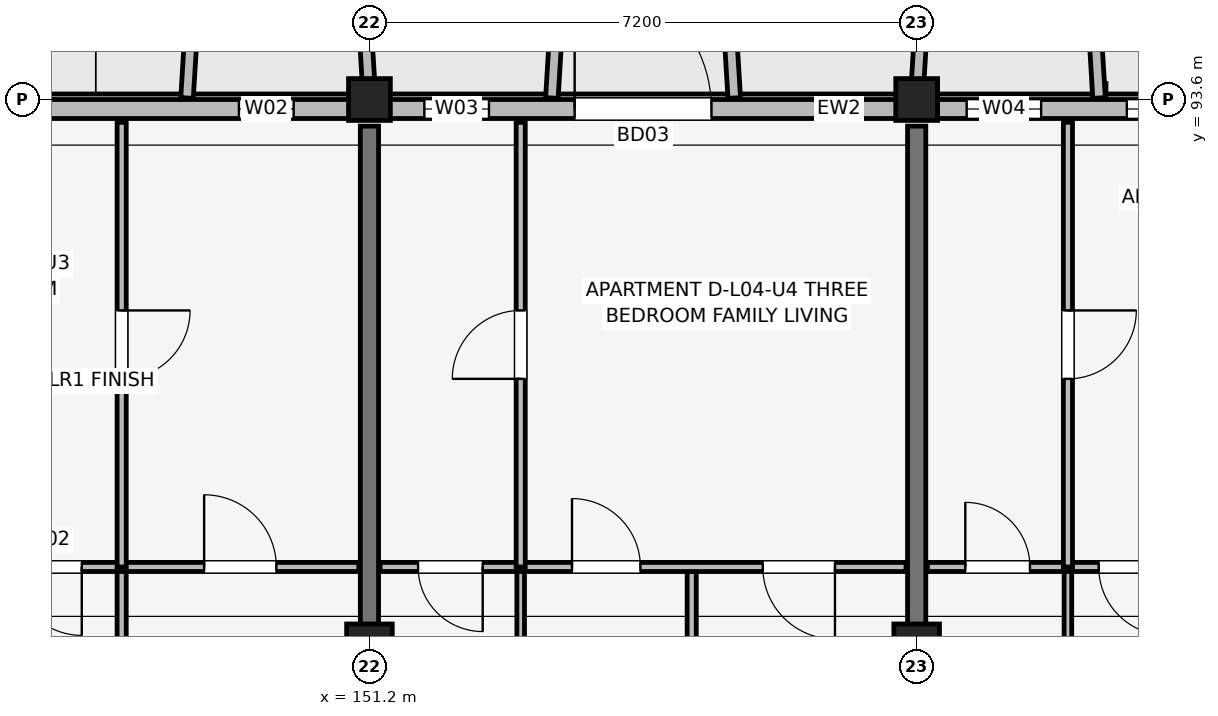
"""IFC4 building model, lengths in metres.
Left out: names, types, materials, properties, quantities, classifications, styles, units other than length and angle.
Written with IfcOpenShell. Run it as: python <this file> out.ifc"""

import sys

from ifc_helpers import new_model, si_unit, direction, frame, frame_2d, origin, origin_2d, place, context, subcontext, project, spatial, rectangle, extrude, element, fill, save


model = new_model("IFC4")
c1 = context("Model", 3, precision=1e-05, world=origin(), true_north=direction((0.0, 1.0)))
c2 = subcontext(c1, "Body", "Model", "MODEL_VIEW")
j1 = project(units=[si_unit("LENGTHUNIT", "METRE"), si_unit("PLANEANGLEUNIT", "RADIAN")], contexts=[c1])
p1 = place(None, origin())
s1 = spatial("IfcSite", under=j1, at=p1, CompositionType="ELEMENT")
p2 = place(p1, origin())
s2 = spatial("IfcBuilding", under=s1, at=p2, CompositionType="ELEMENT")
p3 = place(p2, frame((0.0, 0.0, 15.0)))
s3 = spatial("IfcBuildingStorey", under=s2, at=p3, CompositionType="ELEMENT", Elevation=15.0)
p4 = place(p3, frame((151.2, 86.4, 0.0), z_axis=(0.0, 0.0, 1.0), x_axis=(1.0, 0.0, 0.0)))
e1 = element("IfcColumn", 1, at=p4, inside=s3, PredefinedType="COLUMN", context=c2, shape_type="SweptSolid", body=[
    extrude(rectangle(XDim=0.6, YDim=0.6, at=origin_2d()), origin(), (0.0, 0.0, 1.0), 3.15),
])
p5 = place(p3, frame((151.2, 93.6, 0.0), z_axis=(0.0, 0.0, 1.0), x_axis=(1.0, 0.0, 0.0)))
e2 = element("IfcColumn", 2, at=p5, inside=s3, PredefinedType="COLUMN", context=c2, shape_type="SweptSolid", body=[
    extrude(rectangle(XDim=0.55, YDim=0.55, at=origin_2d()), origin(), (0.0, 0.0, 1.0), 3.15),
])
p6 = place(p3, frame((158.4, 86.4, 0.0), z_axis=(0.0, 0.0, 1.0), x_axis=(1.0, 0.0, 0.0)))
e3 = element("IfcColumn", 3, at=p6, inside=s3, PredefinedType="COLUMN", context=c2, shape_type="SweptSolid", body=[
    extrude(rectangle(XDim=0.6, YDim=0.6, at=origin_2d()), origin(), (0.0, 0.0, 1.0), 3.15),
])
p7 = place(p3, frame((158.4, 93.6, 0.0), z_axis=(0.0, 0.0, 1.0), x_axis=(1.0, 0.0, 0.0)))
e4 = element("IfcColumn", 4, at=p7, inside=s3, PredefinedType="COLUMN", context=c2, shape_type="SweptSolid", body=[
    extrude(rectangle(XDim=0.55, YDim=0.55, at=origin_2d()), origin(), (0.0, 0.0, 1.0), 3.15),
])
for number, where, z_axis, x_axis in (
    (5, (151.2, 83.85, 0.0), (0.0, 0.0, 1.0), (0.0, 1.0, 0.0)),
    (6, (158.4, 83.85, 0.0), (0.0, 0.0, 1.0), (0.0, 1.0, 0.0)),
):
    element("IfcWall", number, at=place(p3, frame(where, z_axis=z_axis, x_axis=x_axis)), inside=s3, PredefinedType="SHEAR", context=c2, shape_type="SweptSolid", body=[
        extrude(rectangle(XDim=9.4, YDim=0.24, at=frame_2d((4.7, 0.0))), origin(), (0.0, 0.0, 1.0), 3.15),
    ])
p8 = place(p3, frame((162.8, 93.475, 0.0), z_axis=(0.0, 0.0, 1.0), x_axis=(-1.0, 0.0, 0.0)))
e7 = element("IfcWall", 7, at=p8, inside=s3, PredefinedType="SOLIDWALL", context=c2, shape_type="SweptSolid", body=[
    extrude(rectangle(XDim=30.4, YDim=0.25, at=frame_2d((15.2, 0.0))), origin(), (0.0, 0.0, 1.0), 2.43),
])
p9 = place(p8, frame((23.15, 0.0, 0.0), z_axis=(0.0, 0.0, 1.0), x_axis=(-1.0, 0.0, 0.0)))
e8 = element("IfcOpeningElement", 8, at=p9, cuts=e7, PredefinedType="OPENING", context=c2, shape_type="SweptSolid", body=[
    extrude(rectangle(XDim=1.5, YDim=2.15, at=frame_2d((0.75, 1.075))), frame((0.0, 0.135, 0.0), z_axis=(0.0, -1.0, 0.0), x_axis=(1.0, 0.0, 0.0)), (0.0, 0.0, 1.0), 0.27),
])
p10 = place(p8, frame((8.9, 0.0, 0.0), z_axis=(0.0, 0.0, 1.0), x_axis=(-1.0, 0.0, 0.0)))
e9 = element("IfcOpeningElement", 9, at=p10, cuts=e7, PredefinedType="OPENING", context=c2, shape_type="SweptSolid", body=[
    extrude(rectangle(XDim=1.8, YDim=2.15, at=frame_2d((0.9, 1.075))), frame((0.0, 0.135, 0.0), z_axis=(0.0, -1.0, 0.0), x_axis=(1.0, 0.0, 0.0)), (0.0, 0.0, 1.0), 0.27),
])
p11 = place(p8, frame((26.498, 0.0, 0.7)))
e10 = element("IfcOpeningElement", 10, at=p11, cuts=e7, PredefinedType="OPENING", context=c2, shape_type="SweptSolid", body=[
    extrude(rectangle(XDim=1.72, YDim=1.6, at=frame_2d((0.86, 0.8))), frame((0.0, 0.135, 0.0), z_axis=(0.0, -1.0, 0.0), x_axis=(1.0, 0.0, 0.0)), (0.0, 0.0, 1.0), 0.27),
])
p12 = place(p8, frame((24.183, 0.0, 0.75)))
e11 = element("IfcOpeningElement", 11, at=p12, cuts=e7, PredefinedType="OPENING", context=c2, shape_type="SweptSolid", body=[
    extrude(rectangle(XDim=1.34, YDim=1.55, at=frame_2d((0.67, 0.775))), frame((0.0, 0.135, 0.0), z_axis=(0.0, -1.0, 0.0), x_axis=(1.0, 0.0, 0.0)), (0.0, 0.0, 1.0), 0.27),
])
p13 = place(p8, frame((16.583, 0.0, 0.7)))
e12 = element("IfcOpeningElement", 12, at=p13, cuts=e7, PredefinedType="OPENING", context=c2, shape_type="SweptSolid", body=[
    extrude(rectangle(XDim=1.72, YDim=1.6, at=frame_2d((0.86, 0.8))), frame((0.0, 0.135, 0.0), z_axis=(0.0, -1.0, 0.0), x_axis=(1.0, 0.0, 0.0)), (0.0, 0.0, 1.0), 0.27),
])
p14 = place(p8, frame((12.597, 0.0, 0.75)))
e13 = element("IfcOpeningElement", 13, at=p14, cuts=e7, PredefinedType="OPENING", context=c2, shape_type="SweptSolid", body=[
    extrude(rectangle(XDim=0.72, YDim=1.35, at=frame_2d((0.36, 0.675))), frame((0.0, 0.135, 0.0), z_axis=(0.0, -1.0, 0.0), x_axis=(1.0, 0.0, 0.0)), (0.0, 0.0, 1.0), 0.27),
])
p15 = place(p8, frame((10.028, 0.0, 0.75)))
e14 = element("IfcOpeningElement", 14, at=p15, cuts=e7, PredefinedType="OPENING", context=c2, shape_type="SweptSolid", body=[
    extrude(rectangle(XDim=0.85, YDim=1.4, at=frame_2d((0.425, 0.7))), frame((0.0, 0.135, 0.0), z_axis=(0.0, -1.0, 0.0), x_axis=(1.0, 0.0, 0.0)), (0.0, 0.0, 1.0), 0.27),
])
p16 = place(p8, frame((2.762, 0.0, 0.75)))
e15 = element("IfcOpeningElement", 15, at=p16, cuts=e7, PredefinedType="OPENING", context=c2, shape_type="SweptSolid", body=[
    extrude(rectangle(XDim=0.98, YDim=1.45, at=frame_2d((0.49, 0.725))), frame((0.0, 0.135, 0.0), z_axis=(0.0, -1.0, 0.0), x_axis=(1.0, 0.0, 0.0)), (0.0, 0.0, 1.0), 0.27),
])
p17 = place(p8, frame((0.535, 0.0, 0.75)))
e16 = element("IfcOpeningElement", 16, at=p17, cuts=e7, PredefinedType="OPENING", context=c2, shape_type="SweptSolid", body=[
    extrude(rectangle(XDim=1.1, YDim=1.5, at=frame_2d((0.55, 0.75))), frame((0.0, 0.135, 0.0), z_axis=(0.0, -1.0, 0.0), x_axis=(1.0, 0.0, 0.0)), (0.0, 0.0, 1.0), 0.27),
])
p18 = place(p3, frame((148.8, 93.62, 0.0), z_axis=(0.0, 0.0, 1.0), x_axis=(0.061046865508, 0.998134900808, 0.0)))
e17 = element("IfcWall", 17, at=p18, inside=s3, PredefinedType="ELEMENTEDWALL", context=c2, shape_type="SweptSolid", body=[
    extrude(rectangle(XDim=1.964, YDim=0.165, at=frame_2d((0.982, 0.0))), origin(), (0.0, 0.0, 1.0), 2.58),
])
p19 = place(p3, frame((151.2, 93.62, 0.0), z_axis=(0.0, 0.0, 1.0), x_axis=(-0.061046865508, 0.998134900808, 0.0)))
e18 = element("IfcWall", 18, at=p19, inside=s3, PredefinedType="ELEMENTEDWALL", context=c2, shape_type="SweptSolid", body=[
    extrude(rectangle(XDim=1.964, YDim=0.165, at=frame_2d((0.982, 0.0))), origin(), (0.0, 0.0, 1.0), 2.95),
])
for number, where, z_axis, x_axis in (
    (19, (153.6, 93.62, 0.0), (0.0, 0.0, 1.0), (0.061, 0.998, 0.0)),
    (20, (156.0, 93.62, 0.0), (0.0, 0.0, 1.0), (-0.061, 0.998, 0.0)),
):
    element("IfcWall", number, at=place(p3, frame(where, z_axis=z_axis, x_axis=x_axis)), inside=s3, PredefinedType="ELEMENTEDWALL", context=c2, shape_type="SweptSolid", body=[
        extrude(rectangle(XDim=1.964, YDim=0.165, at=frame_2d((0.982, 0.0))), origin(), (0.0, 0.0, 1.0), 2.45),
    ])
for number, where, z_axis, x_axis in (
    (21, (158.4, 93.62, 0.0), (0.0, 0.0, 1.0), (0.061, 0.998, 0.0)),
    (22, (160.8, 93.62, 0.0), (0.0, 0.0, 1.0), (-0.061, 0.998, 0.0)),
):
    element("IfcWall", number, at=place(p3, frame(where, z_axis=z_axis, x_axis=x_axis)), inside=s3, PredefinedType="ELEMENTEDWALL", context=c2, shape_type="SweptSolid", body=[
        extrude(rectangle(XDim=1.964, YDim=0.165, at=frame_2d((0.982, 0.0))), origin(), (0.0, 0.0, 1.0), 2.95),
    ])
p20 = place(p3, frame((147.94, 83.7, 0.0), z_axis=(0.0, 0.0, 1.0), x_axis=(0.0, 1.0, 0.0)))
e23 = element("IfcWall", 23, at=p20, inside=s3, PredefinedType="PARTITIONING", context=c2, shape_type="SweptSolid", body=[
    extrude(rectangle(XDim=3.75, YDim=0.12, at=frame_2d((1.875, 0.0))), origin(), (0.0, 0.0, 1.0), 2.375),
])
p21 = place(p3, frame((144.14, 87.45, 0.0), z_axis=(0.0, 0.0, 1.0), x_axis=(1.0, 0.0, 0.0)))
e24 = element("IfcWall", 24, at=p21, inside=s3, PredefinedType="PARTITIONING", context=c2, shape_type="SweptSolid", body=[
    extrude(rectangle(XDim=6.92, YDim=0.12, at=frame_2d((3.46, 0.0))), origin(), (0.0, 0.0, 1.0), 2.38),
])
p22 = place(p21, frame((0.5, 0.0, 0.0)))
e25 = element("IfcOpeningElement", 25, at=p22, cuts=e24, PredefinedType="OPENING", context=c2, shape_type="SweptSolid", body=[
    extrude(rectangle(XDim=0.85, YDim=2.08, at=frame_2d((0.425, 1.04))), frame((0.0, 0.07, 0.0), z_axis=(0.0, -1.0, 0.0), x_axis=(1.0, 0.0, 0.0)), (0.0, 0.0, 1.0), 0.14),
])
p23 = place(p21, frame((3.275, 0.0, 0.0), z_axis=(0.0, 0.0, 1.0), x_axis=(-1.0, 0.0, 0.0)))
e26 = element("IfcOpeningElement", 26, at=p23, cuts=e24, PredefinedType="OPENING", context=c2, shape_type="SweptSolid", body=[
    extrude(rectangle(XDim=0.9, YDim=2.08, at=frame_2d((0.45, 1.04))), frame((0.0, 0.07, 0.0), z_axis=(0.0, -1.0, 0.0), x_axis=(1.0, 0.0, 0.0)), (0.0, 0.0, 1.0), 0.14),
])
p24 = place(p21, frame((4.885, 0.0, 0.0)))
e27 = element("IfcOpeningElement", 27, at=p24, cuts=e24, PredefinedType="OPENING", context=c2, shape_type="SweptSolid", body=[
    extrude(rectangle(XDim=0.95, YDim=2.08, at=frame_2d((0.475, 1.04))), frame((0.0, 0.07, 0.0), z_axis=(0.0, -1.0, 0.0), x_axis=(1.0, 0.0, 0.0)), (0.0, 0.0, 1.0), 0.14),
])
p25 = place(p3, frame((147.94, 87.45, 0.0), z_axis=(0.0, 0.0, 1.0), x_axis=(0.0, 1.0, 0.0)))
e28 = element("IfcWall", 28, at=p25, inside=s3, PredefinedType="PARTITIONING", context=c2, shape_type="SweptSolid", body=[
    extrude(rectangle(XDim=5.85, YDim=0.12, at=frame_2d((2.925, 0.0))), origin(), (0.0, 0.0, 1.0), 2.38),
])
p26 = place(p25, frame((3.375, 0.0, 0.0), z_axis=(0.0, 0.0, 1.0), x_axis=(-1.0, 0.0, 0.0)))
e29 = element("IfcOpeningElement", 29, at=p26, cuts=e28, PredefinedType="OPENING", context=c2, shape_type="SweptSolid", body=[
    extrude(rectangle(XDim=0.9, YDim=2.08, at=frame_2d((0.45, 1.04))), frame((0.0, 0.07, 0.0), z_axis=(0.0, -1.0, 0.0), x_axis=(1.0, 0.0, 0.0)), (0.0, 0.0, 1.0), 0.14),
])
p27 = place(p3, frame((153.19, 83.7, 0.0), z_axis=(0.0, 0.0, 1.0), x_axis=(0.0, 1.0, 0.0)))
e30 = element("IfcWall", 30, at=p27, inside=s3, PredefinedType="PARTITIONING", context=c2, shape_type="SweptSolid", body=[
    extrude(rectangle(XDim=3.75, YDim=0.1, at=frame_2d((1.875, 0.0))), origin(), (0.0, 0.0, 1.0), 2.375),
])
p28 = place(p3, frame((155.44, 83.7, 0.0), z_axis=(0.0, 0.0, 1.0), x_axis=(0.0, 1.0, 0.0)))
e31 = element("IfcWall", 31, at=p28, inside=s3, PredefinedType="PARTITIONING", context=c2, shape_type="SweptSolid", body=[
    extrude(rectangle(XDim=3.75, YDim=0.12, at=frame_2d((1.875, 0.0))), origin(), (0.0, 0.0, 1.0), 2.375),
])
p29 = place(p3, frame((151.34, 87.45, 0.0), z_axis=(0.0, 0.0, 1.0), x_axis=(1.0, 0.0, 0.0)))
e32 = element("IfcWall", 32, at=p29, inside=s3, PredefinedType="PARTITIONING", context=c2, shape_type="SweptSolid", body=[
    extrude(rectangle(XDim=6.92, YDim=0.12, at=frame_2d((3.46, 0.0))), origin(), (0.0, 0.0, 1.0), 2.38),
])
p30 = place(p29, frame((1.35, 0.0, 0.0), z_axis=(0.0, 0.0, 1.0), x_axis=(-1.0, 0.0, 0.0)))
e33 = element("IfcOpeningElement", 33, at=p30, cuts=e32, PredefinedType="OPENING", context=c2, shape_type="SweptSolid", body=[
    extrude(rectangle(XDim=0.85, YDim=2.08, at=frame_2d((0.425, 1.04))), frame((0.0, 0.07, 0.0), z_axis=(0.0, -1.0, 0.0), x_axis=(1.0, 0.0, 0.0)), (0.0, 0.0, 1.0), 0.14),
])
p31 = place(p29, frame((2.525, 0.0, 0.0)))
e34 = element("IfcOpeningElement", 34, at=p31, cuts=e32, PredefinedType="OPENING", context=c2, shape_type="SweptSolid", body=[
    extrude(rectangle(XDim=0.9, YDim=2.08, at=frame_2d((0.45, 1.04))), frame((0.0, 0.07, 0.0), z_axis=(0.0, -1.0, 0.0), x_axis=(1.0, 0.0, 0.0)), (0.0, 0.0, 1.0), 0.14),
])
p32 = place(p29, frame((5.985, 0.0, 0.0), z_axis=(0.0, 0.0, 1.0), x_axis=(-1.0, 0.0, 0.0)))
e35 = element("IfcOpeningElement", 35, at=p32, cuts=e32, PredefinedType="OPENING", context=c2, shape_type="SweptSolid", body=[
    extrude(rectangle(XDim=0.95, YDim=2.08, at=frame_2d((0.475, 1.04))), frame((0.0, 0.07, 0.0), z_axis=(0.0, -1.0, 0.0), x_axis=(1.0, 0.0, 0.0)), (0.0, 0.0, 1.0), 0.14),
])
p33 = place(p3, frame((153.19, 87.45, 0.0), z_axis=(0.0, 0.0, 1.0), x_axis=(0.0, 1.0, 0.0)))
e36 = element("IfcWall", 36, at=p33, inside=s3, PredefinedType="PARTITIONING", context=c2, shape_type="SweptSolid", body=[
    extrude(rectangle(XDim=5.85, YDim=0.12, at=frame_2d((2.925, 0.0))), origin(), (0.0, 0.0, 1.0), 2.38),
])
p34 = place(p33, frame((2.475, 0.0, 0.0)))
e37 = element("IfcOpeningElement", 37, at=p34, cuts=e36, PredefinedType="OPENING", context=c2, shape_type="SweptSolid", body=[
    extrude(rectangle(XDim=0.9, YDim=2.08, at=frame_2d((0.45, 1.04))), frame((0.0, 0.07, 0.0), z_axis=(0.0, -1.0, 0.0), x_axis=(1.0, 0.0, 0.0)), (0.0, 0.0, 1.0), 0.14),
])
p35 = place(p3, frame((160.39, 83.7, 0.0), z_axis=(0.0, 0.0, 1.0), x_axis=(0.0, 1.0, 0.0)))
e38 = element("IfcWall", 38, at=p35, inside=s3, PredefinedType="PARTITIONING", context=c2, shape_type="SweptSolid", body=[
    extrude(rectangle(XDim=3.75, YDim=0.1, at=frame_2d((1.875, 0.0))), origin(), (0.0, 0.0, 1.0), 2.375),
])
p36 = place(p3, frame((158.54, 87.45, 0.0), z_axis=(0.0, 0.0, 1.0), x_axis=(1.0, 0.0, 0.0)))
e39 = element("IfcWall", 39, at=p36, inside=s3, PredefinedType="PARTITIONING", context=c2, shape_type="SweptSolid", body=[
    extrude(rectangle(XDim=6.92, YDim=0.12, at=frame_2d((3.46, 0.0))), origin(), (0.0, 0.0, 1.0), 2.38),
])
p37 = place(p36, frame((0.5, 0.0, 0.0)))
e40 = element("IfcOpeningElement", 40, at=p37, cuts=e39, PredefinedType="OPENING", context=c2, shape_type="SweptSolid", body=[
    extrude(rectangle(XDim=0.85, YDim=2.08, at=frame_2d((0.425, 1.04))), frame((0.0, 0.07, 0.0), z_axis=(0.0, -1.0, 0.0), x_axis=(1.0, 0.0, 0.0)), (0.0, 0.0, 1.0), 0.14),
])
p38 = place(p36, frame((3.155, 0.0, 0.0), z_axis=(0.0, 0.0, 1.0), x_axis=(-1.0, 0.0, 0.0)))
e41 = element("IfcOpeningElement", 41, at=p38, cuts=e39, PredefinedType="OPENING", context=c2, shape_type="SweptSolid", body=[
    extrude(rectangle(XDim=0.9, YDim=2.08, at=frame_2d((0.45, 1.04))), frame((0.0, 0.07, 0.0), z_axis=(0.0, -1.0, 0.0), x_axis=(1.0, 0.0, 0.0)), (0.0, 0.0, 1.0), 0.14),
])
p39 = place(p36, frame((3.91, 0.0, 0.0)))
e42 = element("IfcOpeningElement", 42, at=p39, cuts=e39, PredefinedType="OPENING", context=c2, shape_type="SweptSolid", body=[
    extrude(rectangle(XDim=0.95, YDim=2.08, at=frame_2d((0.475, 1.04))), frame((0.0, 0.07, 0.0), z_axis=(0.0, -1.0, 0.0), x_axis=(1.0, 0.0, 0.0)), (0.0, 0.0, 1.0), 0.14),
])
p40 = place(p3, frame((160.39, 87.45, 0.0), z_axis=(0.0, 0.0, 1.0), x_axis=(0.0, 1.0, 0.0)))
e43 = element("IfcWall", 43, at=p40, inside=s3, PredefinedType="PARTITIONING", context=c2, shape_type="SweptSolid", body=[
    extrude(rectangle(XDim=5.85, YDim=0.12, at=frame_2d((2.925, 0.0))), origin(), (0.0, 0.0, 1.0), 2.38),
])
p41 = place(p40, frame((3.375, 0.0, 0.0), z_axis=(0.0, 0.0, 1.0), x_axis=(-1.0, 0.0, 0.0)))
e44 = element("IfcOpeningElement", 44, at=p41, cuts=e43, PredefinedType="OPENING", context=c2, shape_type="SweptSolid", body=[
    extrude(rectangle(XDim=0.9, YDim=2.08, at=frame_2d((0.45, 1.04))), frame((0.0, 0.07, 0.0), z_axis=(0.0, -1.0, 0.0), x_axis=(1.0, 0.0, 0.0)), (0.0, 0.0, 1.0), 0.14),
])
p42 = place(p10, origin())
e45 = element("IfcDoor", 45, at=p42, inside=s3, OperationType="SINGLE_SWING_RIGHT", PredefinedType="DOOR", context=c2, shape_type="SweptSolid", body=[
    extrude(rectangle(XDim=1.8, YDim=2.15, at=frame_2d((0.9, 1.075))), frame((0.0, 0.025, 0.0), z_axis=(0.0, -1.0, 0.0), x_axis=(1.0, 0.0, 0.0)), (0.0, 0.0, 1.0), 0.05),
])
fill(e9, e45)
p43 = place(p14, origin())
e46 = element("IfcWindow", 46, at=p43, inside=s3, PartitioningType="SINGLE_PANEL", PredefinedType="WINDOW", context=c2, shape_type="SweptSolid", body=[
    extrude(rectangle(XDim=0.72, YDim=1.35, at=frame_2d((0.36, 0.675))), frame((0.0, 0.03, 0.0), z_axis=(0.0, -1.0, 0.0), x_axis=(1.0, 0.0, 0.0)), (0.0, 0.0, 1.0), 0.06),
])
fill(e13, e46)
p44 = place(p15, origin())
e47 = element("IfcWindow", 47, at=p44, inside=s3, PartitioningType="SINGLE_PANEL", PredefinedType="WINDOW", context=c2, shape_type="SweptSolid", body=[
    extrude(rectangle(XDim=0.85, YDim=1.4, at=frame_2d((0.425, 0.7))), frame((0.0, 0.03, 0.0), z_axis=(0.0, -1.0, 0.0), x_axis=(1.0, 0.0, 0.0)), (0.0, 0.0, 1.0), 0.06),
])
fill(e14, e47)
p45 = place(p16, origin())
e48 = element("IfcWindow", 48, at=p45, inside=s3, PartitioningType="SINGLE_PANEL", PredefinedType="WINDOW", context=c2, shape_type="SweptSolid", body=[
    extrude(rectangle(XDim=0.98, YDim=1.45, at=frame_2d((0.49, 0.725))), frame((0.0, 0.03, 0.0), z_axis=(0.0, -1.0, 0.0), x_axis=(1.0, 0.0, 0.0)), (0.0, 0.0, 1.0), 0.06),
])
fill(e15, e48)
p46 = place(p17, origin())
e49 = element("IfcWindow", 49, at=p46, inside=s3, PartitioningType="SINGLE_PANEL", PredefinedType="WINDOW", context=c2, shape_type="SweptSolid", body=[
    extrude(rectangle(XDim=1.1, YDim=1.5, at=frame_2d((0.55, 0.75))), frame((0.0, 0.03, 0.0), z_axis=(0.0, -1.0, 0.0), x_axis=(1.0, 0.0, 0.0)), (0.0, 0.0, 1.0), 0.06),
])
fill(e16, e49)
p47 = place(p23, origin())
e50 = element("IfcDoor", 50, at=p47, inside=s3, OperationType="SINGLE_SWING_RIGHT", PredefinedType="DOOR", context=c2, shape_type="SweptSolid", body=[
    extrude(rectangle(XDim=0.9, YDim=2.08, at=frame_2d((0.45, 1.04))), frame((0.0, 0.025, 0.0), z_axis=(0.0, -1.0, 0.0), x_axis=(1.0, 0.0, 0.0)), (0.0, 0.0, 1.0), 0.05),
])
fill(e26, e50)
p48 = place(p24, origin())
e51 = element("IfcDoor", 51, at=p48, inside=s3, OperationType="SINGLE_SWING_LEFT", PredefinedType="DOOR", context=c2, shape_type="SweptSolid", body=[
    extrude(rectangle(XDim=0.95, YDim=2.08, at=frame_2d((0.475, 1.04))), frame((0.0, 0.025, 0.0), z_axis=(0.0, -1.0, 0.0), x_axis=(1.0, 0.0, 0.0)), (0.0, 0.0, 1.0), 0.05),
])
fill(e27, e51)
p49 = place(p26, origin())
e52 = element("IfcDoor", 52, at=p49, inside=s3, OperationType="SINGLE_SWING_RIGHT", PredefinedType="DOOR", context=c2, shape_type="SweptSolid", body=[
    extrude(rectangle(XDim=0.9, YDim=2.08, at=frame_2d((0.45, 1.04))), frame((0.0, 0.025, 0.0), z_axis=(0.0, -1.0, 0.0), x_axis=(1.0, 0.0, 0.0)), (0.0, 0.0, 1.0), 0.05),
])
fill(e29, e52)
p50 = place(p30, origin())
e53 = element("IfcDoor", 53, at=p50, inside=s3, OperationType="SINGLE_SWING_RIGHT", PredefinedType="DOOR", context=c2, shape_type="SweptSolid", body=[
    extrude(rectangle(XDim=0.85, YDim=2.08, at=frame_2d((0.425, 1.04))), frame((0.0, 0.025, 0.0), z_axis=(0.0, -1.0, 0.0), x_axis=(1.0, 0.0, 0.0)), (0.0, 0.0, 1.0), 0.05),
])
fill(e33, e53)
p51 = place(p31, origin())
e54 = element("IfcDoor", 54, at=p51, inside=s3, OperationType="SINGLE_SWING_LEFT", PredefinedType="DOOR", context=c2, shape_type="SweptSolid", body=[
    extrude(rectangle(XDim=0.9, YDim=2.08, at=frame_2d((0.45, 1.04))), frame((0.0, 0.025, 0.0), z_axis=(0.0, -1.0, 0.0), x_axis=(1.0, 0.0, 0.0)), (0.0, 0.0, 1.0), 0.05),
])
fill(e34, e54)
p52 = place(p32, origin())
e55 = element("IfcDoor", 55, at=p52, inside=s3, OperationType="SINGLE_SWING_RIGHT", PredefinedType="DOOR", context=c2, shape_type="SweptSolid", body=[
    extrude(rectangle(XDim=0.95, YDim=2.08, at=frame_2d((0.475, 1.04))), frame((0.0, 0.025, 0.0), z_axis=(0.0, -1.0, 0.0), x_axis=(1.0, 0.0, 0.0)), (0.0, 0.0, 1.0), 0.05),
])
fill(e35, e55)
p53 = place(p34, origin())
e56 = element("IfcDoor", 56, at=p53, inside=s3, OperationType="SINGLE_SWING_LEFT", PredefinedType="DOOR", context=c2, shape_type="SweptSolid", body=[
    extrude(rectangle(XDim=0.9, YDim=2.08, at=frame_2d((0.45, 1.04))), frame((0.0, 0.025, 0.0), z_axis=(0.0, -1.0, 0.0), x_axis=(1.0, 0.0, 0.0)), (0.0, 0.0, 1.0), 0.05),
])
fill(e37, e56)
p54 = place(p37, origin())
e57 = element("IfcDoor", 57, at=p54, inside=s3, OperationType="SINGLE_SWING_LEFT", PredefinedType="DOOR", context=c2, shape_type="SweptSolid", body=[
    extrude(rectangle(XDim=0.85, YDim=2.08, at=frame_2d((0.425, 1.04))), frame((0.0, 0.025, 0.0), z_axis=(0.0, -1.0, 0.0), x_axis=(1.0, 0.0, 0.0)), (0.0, 0.0, 1.0), 0.05),
])
fill(e40, e57)
p55 = place(p38, origin())
e58 = element("IfcDoor", 58, at=p55, inside=s3, OperationType="SINGLE_SWING_RIGHT", PredefinedType="DOOR", context=c2, shape_type="SweptSolid", body=[
    extrude(rectangle(XDim=0.9, YDim=2.08, at=frame_2d((0.45, 1.04))), frame((0.0, 0.025, 0.0), z_axis=(0.0, -1.0, 0.0), x_axis=(1.0, 0.0, 0.0)), (0.0, 0.0, 1.0), 0.05),
])
fill(e41, e58)
p56 = place(p41, origin())
e59 = element("IfcDoor", 59, at=p56, inside=s3, OperationType="SINGLE_SWING_RIGHT", PredefinedType="DOOR", context=c2, shape_type="SweptSolid", body=[
    extrude(rectangle(XDim=0.9, YDim=2.08, at=frame_2d((0.45, 1.04))), frame((0.0, 0.025, 0.0), z_axis=(0.0, -1.0, 0.0), x_axis=(1.0, 0.0, 0.0)), (0.0, 0.0, 1.0), 0.05),
])
fill(e44, e59)
save(model, sys.argv[1])
